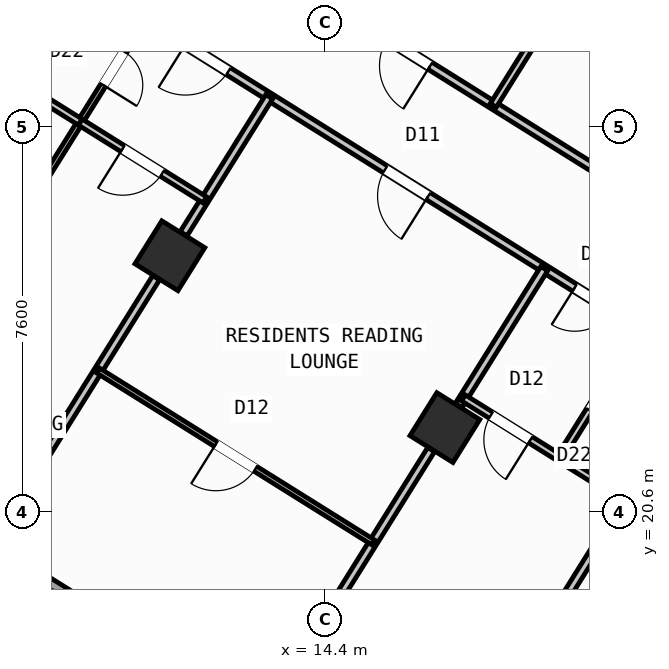
"""IFC4 building model, lengths in metres.
Left out: names, types, materials, properties, quantities, classifications, styles, units other than length and angle.
Written with IfcOpenShell. Run it as: python <this file> out.ifc"""

import sys

from ifc_helpers import new_model, si_unit, direction, frame, frame_2d, origin, origin_2d, place, context, subcontext, project, spatial, rectangle, hollow_rectangle, extrude, source, transform, mapped, element, fill, save


model = new_model("IFC4")
c1 = context("Model", 3, precision=1e-05, world=origin(), true_north=direction((0.0, 1.0)))
c2 = subcontext(c1, "Body", "Model", "MODEL_VIEW")
j1 = project(units=[si_unit("LENGTHUNIT", "METRE"), si_unit("PLANEANGLEUNIT", "RADIAN")], contexts=[c1])
p1 = place(None, origin())
s1 = spatial("IfcSite", under=j1, at=p1, CompositionType="ELEMENT")
p2 = place(p1, origin())
s2 = spatial("IfcBuilding", under=s1, at=p2, CompositionType="ELEMENT")
p3 = place(p2, frame((0.0, 0.0, 52.8)))
s3 = spatial("IfcBuildingStorey", under=s2, at=p3, CompositionType="ELEMENT", Elevation=52.8)
m1 = source(origin(), c2, "Body", "SweptSolid", [
    extrude(hollow_rectangle(XDim=1.0, YDim=1.0, WallThickness=0.04, at=origin_2d()), origin(), (0.0, 0.0, 1.0), 3.6),
])
for number, where, z_axis, x_axis in (
    (1, (16.764, 22.261, 0.0), (0.0, 0.0, 1.0), (-0.848, 0.53, 0.0)),
    (2, (11.336, 25.653, 0.0), (0.0, 0.0, 1.0), (-0.848, 0.53, 0.0)),
):
    element("IfcColumn", number, at=place(p3, frame(where, z_axis=z_axis, x_axis=x_axis)), inside=s3, PredefinedType="COLUMN", context=c2, shape_type="MappedRepresentation", body=[
        mapped(m1, transform((0.0, 0.0, 0.0), scale=1.0)),
    ])
p4 = place(p3, frame((29.268, 6.429, 0.0), z_axis=(0.0, 0.0, 1.0), x_axis=(-0.848049971435, 0.529916263149, 0.0)))
e3 = element("IfcWall", 3, at=p4, inside=s3, PredefinedType="STANDARD", context=c2, shape_type="SweptSolid", body=[
    extrude(rectangle(XDim=31.588, YDim=0.32, at=frame_2d((15.794, 0.0))), origin(), (0.0, 0.0, 1.0), 3.35),
])
p5 = place(p4, frame((16.362, 0.0, 0.0)))
e4 = element("IfcOpeningElement", 4, at=p5, cuts=e3, PredefinedType="OPENING", context=c2, shape_type="SweptSolid", body=[
    extrude(rectangle(XDim=1.2, YDim=2.15, at=frame_2d((0.6, 1.075))), frame((0.0, 0.17, 0.0), z_axis=(0.0, -1.0, 0.0), x_axis=(1.0, 0.0, 0.0)), (0.0, 0.0, 1.0), 0.34),
])
p6 = place(p4, frame((2.989, 0.0, 0.8)))
e5 = element("IfcOpeningElement", 5, at=p6, cuts=e3, PredefinedType="OPENING", context=c2, shape_type="SweptSolid", body=[
    extrude(rectangle(XDim=2.1, YDim=1.55, at=frame_2d((1.05, 0.775))), frame((0.0, 0.17, 0.0), z_axis=(0.0, -1.0, 0.0), x_axis=(1.0, 0.0, 0.0)), (0.0, 0.0, 1.0), 0.34),
])
p7 = place(p4, frame((8.359, 0.0, 0.8)))
e6 = element("IfcOpeningElement", 6, at=p7, cuts=e3, PredefinedType="OPENING", context=c2, shape_type="SweptSolid", body=[
    extrude(rectangle(XDim=2.1, YDim=1.55, at=frame_2d((1.05, 0.775))), frame((0.0, 0.17, 0.0), z_axis=(0.0, -1.0, 0.0), x_axis=(1.0, 0.0, 0.0)), (0.0, 0.0, 1.0), 0.34),
])
p8 = place(p4, frame((13.284, 0.0, 0.95)))
e7 = element("IfcOpeningElement", 7, at=p8, cuts=e3, PredefinedType="OPENING", context=c2, shape_type="SweptSolid", body=[
    extrude(rectangle(XDim=1.2, YDim=1.4, at=frame_2d((0.6, 0.7))), frame((0.0, 0.17, 0.0), z_axis=(0.0, -1.0, 0.0), x_axis=(1.0, 0.0, 0.0)), (0.0, 0.0, 1.0), 0.34),
])
p9 = place(p4, frame((20.259, 0.0, 0.95)))
e8 = element("IfcOpeningElement", 8, at=p9, cuts=e3, PredefinedType="OPENING", context=c2, shape_type="SweptSolid", body=[
    extrude(rectangle(XDim=1.2, YDim=1.4, at=frame_2d((0.6, 0.7))), frame((0.0, 0.17, 0.0), z_axis=(0.0, -1.0, 0.0), x_axis=(1.0, 0.0, 0.0)), (0.0, 0.0, 1.0), 0.34),
])
p10 = place(p4, frame((22.929, 0.0, 0.95)))
e9 = element("IfcOpeningElement", 9, at=p10, cuts=e3, PredefinedType="OPENING", context=c2, shape_type="SweptSolid", body=[
    extrude(rectangle(XDim=1.2, YDim=1.4, at=frame_2d((0.6, 0.7))), frame((0.0, 0.17, 0.0), z_axis=(0.0, -1.0, 0.0), x_axis=(1.0, 0.0, 0.0)), (0.0, 0.0, 1.0), 0.34),
])
p11 = place(p4, frame((26.106, 0.0, 0.85)))
e10 = element("IfcOpeningElement", 10, at=p11, cuts=e3, PredefinedType="OPENING", context=c2, shape_type="SweptSolid", body=[
    extrude(rectangle(XDim=1.5, YDim=1.5, at=frame_2d((0.75, 0.75))), frame((0.0, 0.17, 0.0), z_axis=(0.0, -1.0, 0.0), x_axis=(1.0, 0.0, 0.0)), (0.0, 0.0, 1.0), 0.34),
])
p12 = place(p4, frame((29.068, 0.0, 0.85)))
e11 = element("IfcOpeningElement", 11, at=p12, cuts=e3, PredefinedType="OPENING", context=c2, shape_type="SweptSolid", body=[
    extrude(rectangle(XDim=1.8, YDim=1.5, at=frame_2d((0.9, 0.75))), frame((0.0, 0.17, 0.0), z_axis=(0.0, -1.0, 0.0), x_axis=(1.0, 0.0, 0.0)), (0.0, 0.0, 1.0), 0.34),
])
p13 = place(p3, frame((2.415, 23.452, 0.0), z_axis=(0.0, 0.0, 1.0), x_axis=(0.52991049553, 0.848053575387, 0.0)))
e12 = element("IfcWall", 12, at=p13, inside=s3, PredefinedType="STANDARD", context=c2, shape_type="SweptSolid", body=[
    extrude(rectangle(XDim=21.587, YDim=0.32, at=frame_2d((10.794, 0.0))), origin(), (0.0, 0.0, 1.0), 2.725),
])
p14 = place(p13, frame((2.356, 0.0, 0.8)))
e13 = element("IfcOpeningElement", 13, at=p14, cuts=e12, PredefinedType="OPENING", context=c2, shape_type="SweptSolid", body=[
    extrude(rectangle(XDim=2.1, YDim=1.55, at=frame_2d((1.05, 0.775))), frame((0.0, 0.17, 0.0), z_axis=(0.0, -1.0, 0.0), x_axis=(1.0, 0.0, 0.0)), (0.0, 0.0, 1.0), 0.34),
])
p15 = place(p13, frame((8.639, 0.0, 1.0)))
e14 = element("IfcOpeningElement", 14, at=p15, cuts=e12, PredefinedType="OPENING", context=c2, shape_type="SweptSolid", body=[
    extrude(rectangle(XDim=0.9, YDim=1.25, at=frame_2d((0.45, 0.625))), frame((0.0, 0.17, 0.0), z_axis=(0.0, -1.0, 0.0), x_axis=(1.0, 0.0, 0.0)), (0.0, 0.0, 1.0), 0.34),
])
p16 = place(p13, frame((17.129, 0.0, 0.85)))
e15 = element("IfcOpeningElement", 15, at=p16, cuts=e12, PredefinedType="OPENING", context=c2, shape_type="SweptSolid", body=[
    extrude(rectangle(XDim=1.5, YDim=1.5, at=frame_2d((0.75, 0.75))), frame((0.0, 0.17, 0.0), z_axis=(0.0, -1.0, 0.0), x_axis=(1.0, 0.0, 0.0)), (0.0, 0.0, 1.0), 0.34),
])
p17 = place(p3, frame((14.138, 41.825, 0.0), z_axis=(0.0, 0.0, 1.0), x_axis=(0.848046498049, -0.529921821731, 0.0)))
e16 = element("IfcWall", 16, at=p17, inside=s3, PredefinedType="STANDARD", context=c2, shape_type="SweptSolid", body=[
    extrude(rectangle(XDim=31.588, YDim=0.32, at=frame_2d((15.794, 0.0))), origin(), (0.0, 0.0, 1.0), 3.35),
])
p18 = place(p17, frame((3.159, 0.0, 0.0)))
e17 = element("IfcOpeningElement", 17, at=p18, cuts=e16, PredefinedType="OPENING", context=c2, shape_type="SweptSolid", body=[
    extrude(rectangle(XDim=1.05, YDim=2.15, at=frame_2d((0.525, 1.075))), frame((0.0, 0.17, 0.0), z_axis=(0.0, -1.0, 0.0), x_axis=(1.0, 0.0, 0.0)), (0.0, 0.0, 1.0), 0.34),
])
p19 = place(p17, frame((0.906, 0.0, 1.0)))
e18 = element("IfcOpeningElement", 18, at=p19, cuts=e16, PredefinedType="OPENING", context=c2, shape_type="SweptSolid", body=[
    extrude(rectangle(XDim=0.9, YDim=1.25, at=frame_2d((0.45, 0.625))), frame((0.0, 0.17, 0.0), z_axis=(0.0, -1.0, 0.0), x_axis=(1.0, 0.0, 0.0)), (0.0, 0.0, 1.0), 0.34),
])
p20 = place(p17, frame((9.537, 0.0, 0.85)))
e19 = element("IfcOpeningElement", 19, at=p20, cuts=e16, PredefinedType="OPENING", context=c2, shape_type="SweptSolid", body=[
    extrude(rectangle(XDim=1.8, YDim=1.5, at=frame_2d((0.9, 0.75))), frame((0.0, 0.17, 0.0), z_axis=(0.0, -1.0, 0.0), x_axis=(1.0, 0.0, 0.0)), (0.0, 0.0, 1.0), 0.34),
])
p21 = place(p17, frame((13.899, 0.0, 0.85)))
e20 = element("IfcOpeningElement", 20, at=p21, cuts=e16, PredefinedType="OPENING", context=c2, shape_type="SweptSolid", body=[
    extrude(rectangle(XDim=1.5, YDim=1.5, at=frame_2d((0.75, 0.75))), frame((0.0, 0.17, 0.0), z_axis=(0.0, -1.0, 0.0), x_axis=(1.0, 0.0, 0.0)), (0.0, 0.0, 1.0), 0.34),
])
p22 = place(p17, frame((22.019, 0.0, 0.95)))
e21 = element("IfcOpeningElement", 21, at=p22, cuts=e16, PredefinedType="OPENING", context=c2, shape_type="SweptSolid", body=[
    extrude(rectangle(XDim=1.2, YDim=1.4, at=frame_2d((0.6, 0.7))), frame((0.0, 0.17, 0.0), z_axis=(0.0, -1.0, 0.0), x_axis=(1.0, 0.0, 0.0)), (0.0, 0.0, 1.0), 0.34),
])
p23 = place(p17, frame((27.569, 0.0, 0.95)))
e22 = element("IfcOpeningElement", 22, at=p23, cuts=e16, PredefinedType="OPENING", context=c2, shape_type="SweptSolid", body=[
    extrude(rectangle(XDim=1.2, YDim=1.4, at=frame_2d((0.6, 0.7))), frame((0.0, 0.17, 0.0), z_axis=(0.0, -1.0, 0.0), x_axis=(1.0, 0.0, 0.0)), (0.0, 0.0, 1.0), 0.34),
])
p24 = place(p3, frame((21.938, 23.391, 0.0), z_axis=(0.0, 0.0, 1.0), x_axis=(-0.529924725692, -0.848044683434, 0.0)))
e23 = element("IfcWall", 23, at=p24, inside=s3, PredefinedType="PARTITIONING", context=c2, shape_type="SweptSolid", body=[
    extrude(rectangle(XDim=10.35, YDim=0.16, at=frame_2d((5.175, 0.0))), origin(), (0.0, 0.0, 1.0), 3.34),
])
p25 = place(p3, frame((23.104, 25.256, 0.0), z_axis=(0.0, 0.0, 1.0), x_axis=(-0.848041752158, 0.529929416617, 0.0)))
e24 = element("IfcWall", 24, at=p25, inside=s3, PredefinedType="PARTITIONING", context=c2, shape_type="SweptSolid", body=[
    extrude(rectangle(XDim=16.73, YDim=0.16, at=frame_2d((8.365, 0.0))), origin(), (0.0, 0.0, 1.0), 3.34),
])
p26 = place(p25, frame((1.395, 0.0, 0.0)))
e25 = element("IfcOpeningElement", 25, at=p26, cuts=e24, PredefinedType="OPENING", context=c2, shape_type="SweptSolid", body=[
    extrude(rectangle(XDim=1.0, YDim=2.1, at=frame_2d((0.5, 1.05))), frame((0.0, 0.09, 0.0), z_axis=(0.0, -1.0, 0.0), x_axis=(1.0, 0.0, 0.0)), (0.0, 0.0, 1.0), 0.18),
])
p27 = place(p25, frame((7.82, 0.0, 0.0)))
e26 = element("IfcOpeningElement", 26, at=p27, cuts=e24, PredefinedType="OPENING", context=c2, shape_type="SweptSolid", body=[
    extrude(rectangle(XDim=1.0, YDim=2.1, at=frame_2d((0.5, 1.05))), frame((0.0, 0.09, 0.0), z_axis=(0.0, -1.0, 0.0), x_axis=(1.0, 0.0, 0.0)), (0.0, 0.0, 1.0), 0.18),
])
p28 = place(p25, frame((14.76, 0.0, 0.0)))
e27 = element("IfcOpeningElement", 27, at=p28, cuts=e24, PredefinedType="OPENING", context=c2, shape_type="SweptSolid", body=[
    extrude(rectangle(XDim=1.0, YDim=2.1, at=frame_2d((0.5, 1.05))), frame((0.0, 0.09, 0.0), z_axis=(0.0, -1.0, 0.0), x_axis=(1.0, 0.0, 0.0)), (0.0, 0.0, 1.0), 0.18),
])
p29 = place(p3, frame((21.938, 23.391, 0.0), z_axis=(0.0, 0.0, 1.0), x_axis=(-0.848045850158, 0.529922858565, 0.0)))
e28 = element("IfcWall", 28, at=p29, inside=s3, PredefinedType="PARTITIONING", context=c2, shape_type="SweptSolid", body=[
    extrude(rectangle(XDim=16.73, YDim=0.16, at=frame_2d((8.365, 0.0))), origin(), (0.0, 0.0, 1.0), 3.34),
])
p30 = place(p29, frame((2.22, 0.0, 0.0)))
e29 = element("IfcOpeningElement", 29, at=p30, cuts=e28, PredefinedType="OPENING", context=c2, shape_type="SweptSolid", body=[
    extrude(rectangle(XDim=0.86, YDim=2.05, at=frame_2d((0.43, 1.025))), frame((0.0, 0.09, 0.0), z_axis=(0.0, -1.0, 0.0), x_axis=(1.0, 0.0, 0.0)), (0.0, 0.0, 1.0), 0.18),
])
p31 = place(p29, frame((6.49, 0.0, 0.0)))
e30 = element("IfcOpeningElement", 30, at=p31, cuts=e28, PredefinedType="OPENING", context=c2, shape_type="SweptSolid", body=[
    extrude(rectangle(XDim=1.0, YDim=2.1, at=frame_2d((0.5, 1.05))), frame((0.0, 0.09, 0.0), z_axis=(0.0, -1.0, 0.0), x_axis=(1.0, 0.0, 0.0)), (0.0, 0.0, 1.0), 0.18),
])
p32 = place(p29, frame((11.14, 0.0, 0.0)))
e31 = element("IfcOpeningElement", 31, at=p32, cuts=e28, PredefinedType="OPENING", context=c2, shape_type="SweptSolid", body=[
    extrude(rectangle(XDim=1.0, YDim=2.1, at=frame_2d((0.5, 1.05))), frame((0.0, 0.09, 0.0), z_axis=(0.0, -1.0, 0.0), x_axis=(1.0, 0.0, 0.0)), (0.0, 0.0, 1.0), 0.18),
])
p33 = place(p3, frame((18.724, 25.399, 0.0), z_axis=(0.0, 0.0, 1.0), x_axis=(-0.529930102756, -0.848041323399, 0.0)))
e32 = element("IfcWall", 32, at=p33, inside=s3, PredefinedType="PARTITIONING", context=c2, shape_type="SweptSolid", body=[
    extrude(rectangle(XDim=3.188, YDim=0.16, at=frame_2d((1.594, 0.0))), origin(), (0.0, 0.0, 1.0), 2.725),
])
p34 = place(p3, frame((16.492, 21.827, 0.0), z_axis=(0.0, 0.0, 1.0), x_axis=(-0.529904608059, -0.848057254175, 0.0)))
e33 = element("IfcWall", 33, at=p34, inside=s3, PredefinedType="PARTITIONING", context=c2, shape_type="SweptSolid", body=[
    extrude(rectangle(XDim=5.351, YDim=0.16, at=frame_2d((2.675, 0.0))), origin(), (0.0, 0.0, 1.0), 2.725),
])
p35 = place(p3, frame((20.343, 20.838, 0.0), z_axis=(0.0, 0.0, 1.0), x_axis=(-0.848059820872, 0.529900500304, 0.0)))
e34 = element("IfcWall", 34, at=p35, inside=s3, PredefinedType="PLUMBINGWALL", context=c2, shape_type="SweptSolid", body=[
    extrude(rectangle(XDim=3.79, YDim=0.14, at=frame_2d((1.895, 0.0))), origin(), (0.0, 0.0, 1.0), 3.34),
])
p36 = place(p35, frame((2.23, 0.0, 0.0)))
e35 = element("IfcOpeningElement", 35, at=p36, cuts=e34, PredefinedType="OPENING", context=c2, shape_type="SweptSolid", body=[
    extrude(rectangle(XDim=0.92, YDim=2.08, at=frame_2d((0.46, 1.04))), frame((0.0, 0.08, 0.0), z_axis=(0.0, -1.0, 0.0), x_axis=(1.0, 0.0, 0.0)), (0.0, 0.0, 1.0), 0.16),
])
p37 = place(p3, frame((20.624, 24.212, 0.0), z_axis=(0.0, 0.0, 1.0), x_axis=(-0.529940615993, -0.848034753722, 0.0)))
e36 = element("IfcWall", 36, at=p37, inside=s3, PredefinedType="PLUMBINGWALL", context=c2, shape_type="SweptSolid", body=[
    extrude(rectangle(XDim=3.01, YDim=0.14, at=frame_2d((1.505, 0.0))), origin(), (0.0, 0.0, 1.0), 2.995),
])
p38 = place(p37, frame((1.115, 0.0, 0.0)))
e37 = element("IfcOpeningElement", 37, at=p38, cuts=e36, PredefinedType="OPENING", context=c2, shape_type="SweptSolid", body=[
    extrude(rectangle(XDim=0.78, YDim=2.05, at=frame_2d((0.39, 1.025))), frame((0.0, 0.08, 0.0), z_axis=(0.0, -1.0, 0.0), x_axis=(1.0, 0.0, 0.0)), (0.0, 0.0, 1.0), 0.16),
])
p39 = place(p3, frame((13.297, 28.791, 0.0), z_axis=(0.0, 0.0, 1.0), x_axis=(-0.529930102756, -0.848041323399, 0.0)))
e38 = element("IfcWall", 38, at=p39, inside=s3, PredefinedType="PARTITIONING", context=c2, shape_type="SweptSolid", body=[
    extrude(rectangle(XDim=3.188, YDim=0.16, at=frame_2d((1.594, 0.0))), origin(), (0.0, 0.0, 1.0), 2.725),
])
p40 = place(p3, frame((11.065, 25.219, 0.0), z_axis=(0.0, 0.0, 1.0), x_axis=(-0.529904608059, -0.848057254175, 0.0)))
e39 = element("IfcWall", 39, at=p40, inside=s3, PredefinedType="PARTITIONING", context=c2, shape_type="SweptSolid", body=[
    extrude(rectangle(XDim=5.351, YDim=0.16, at=frame_2d((2.675, 0.0))), origin(), (0.0, 0.0, 1.0), 2.725),
])
p41 = place(p3, frame((15.348, 19.995, 0.0), z_axis=(0.0, 0.0, 1.0), x_axis=(-0.848056163074, 0.529906354247, 0.0)))
e40 = element("IfcWall", 40, at=p41, inside=s3, PredefinedType="PARTITIONING", context=c2, shape_type="SweptSolid", body=[
    extrude(rectangle(XDim=6.4, YDim=0.11, at=frame_2d((3.2, 0.0))), origin(), (0.0, 0.0, 1.0), 3.34),
])
p42 = place(p41, frame((2.74, 0.0, 0.0)))
e41 = element("IfcOpeningElement", 41, at=p42, cuts=e40, PredefinedType="OPENING", context=c2, shape_type="SweptSolid", body=[
    extrude(rectangle(XDim=0.92, YDim=2.08, at=frame_2d((0.46, 1.04))), frame((0.0, 0.065, 0.0), z_axis=(0.0, -1.0, 0.0), x_axis=(1.0, 0.0, 0.0)), (0.0, 0.0, 1.0), 0.13),
])
p43 = place(p3, frame((10.837, 30.327, 0.0), z_axis=(0.0, 0.0, 1.0), x_axis=(-0.529912148489, -0.848052542525, 0.0)))
e42 = element("IfcWall", 42, at=p43, inside=s3, PredefinedType="PARTITIONING", context=c2, shape_type="SweptSolid", body=[
    extrude(rectangle(XDim=10.62, YDim=0.11, at=frame_2d((5.31, 0.0))), origin(), (0.0, 0.0, 1.0), 3.34),
])
p44 = place(p43, frame((0.76, 0.0, 0.0)))
e43 = element("IfcOpeningElement", 43, at=p44, cuts=e42, PredefinedType="OPENING", context=c2, shape_type="SweptSolid", body=[
    extrude(rectangle(XDim=0.78, YDim=2.05, at=frame_2d((0.39, 1.025))), frame((0.0, 0.065, 0.0), z_axis=(0.0, -1.0, 0.0), x_axis=(1.0, 0.0, 0.0)), (0.0, 0.0, 1.0), 0.13),
])
p45 = place(p43, frame((6.05, 0.0, 0.0)))
e44 = element("IfcOpeningElement", 44, at=p45, cuts=e42, PredefinedType="OPENING", context=c2, shape_type="SweptSolid", body=[
    extrude(rectangle(XDim=0.92, YDim=2.08, at=frame_2d((0.46, 1.04))), frame((0.0, 0.065, 0.0), z_axis=(0.0, -1.0, 0.0), x_axis=(1.0, 0.0, 0.0)), (0.0, 0.0, 1.0), 0.13),
])
p46 = place(p3, frame((12.025, 26.755, 0.0), z_axis=(0.0, 0.0, 1.0), x_axis=(-0.848059786386, 0.529900555496, 0.0)))
e45 = element("IfcWall", 45, at=p46, inside=s3, PredefinedType="PLUMBINGWALL", context=c2, shape_type="SweptSolid", body=[
    extrude(rectangle(XDim=2.9, YDim=0.14, at=frame_2d((1.45, 0.0))), origin(), (0.0, 0.0, 1.0), 3.34),
])
p47 = place(p46, frame((0.99, 0.0, 0.0)))
e46 = element("IfcOpeningElement", 46, at=p47, cuts=e45, PredefinedType="OPENING", context=c2, shape_type="SweptSolid", body=[
    extrude(rectangle(XDim=0.92, YDim=2.08, at=frame_2d((0.46, 1.04))), frame((0.0, 0.08, 0.0), z_axis=(0.0, -1.0, 0.0), x_axis=(1.0, 0.0, 0.0)), (0.0, 0.0, 1.0), 0.16),
])
p48 = place(p3, frame((9.566, 28.292, 0.0), z_axis=(0.0, 0.0, 1.0), x_axis=(-0.848021036626, 0.529962566074, 0.0)))
e47 = element("IfcWall", 47, at=p48, inside=s3, PredefinedType="PLUMBINGWALL", context=c2, shape_type="SweptSolid", body=[
    extrude(rectangle(XDim=3.62, YDim=0.14, at=frame_2d((1.81, 0.0))), origin(), (0.0, 0.0, 1.0), 3.34),
])
p49 = place(p3, frame((19.616, 31.657, 0.0), z_axis=(0.0, 0.0, 1.0), x_axis=(-0.529876336437, -0.84807491891, 0.0)))
e48 = element("IfcWall", 48, at=p49, inside=s3, PredefinedType="PLUMBINGWALL", context=c2, shape_type="SweptSolid", body=[
    extrude(rectangle(XDim=3.58, YDim=0.14, at=frame_2d((1.79, 0.0))), origin(), (0.0, 0.0, 1.0), 3.34),
])
p50 = place(p49, frame((1.4, 0.0, 0.0)))
e49 = element("IfcOpeningElement", 49, at=p50, cuts=e48, PredefinedType="OPENING", context=c2, shape_type="SweptSolid", body=[
    extrude(rectangle(XDim=0.78, YDim=2.05, at=frame_2d((0.39, 1.025))), frame((0.0, 0.08, 0.0), z_axis=(0.0, -1.0, 0.0), x_axis=(1.0, 0.0, 0.0)), (0.0, 0.0, 1.0), 0.16),
])
m2 = source(origin(), c2, "Body", "SweptSolid", [
    extrude(rectangle(XDim=1.2, YDim=1.4, at=frame_2d((0.6, 0.7))), frame((0.0, 0.03, 0.0), z_axis=(0.0, -1.0, 0.0), x_axis=(1.0, 0.0, 0.0)), (0.0, 0.0, 1.0), 0.06),
])
p51 = place(p10, origin())
e50 = element("IfcWindow", 50, at=p51, inside=s3, PartitioningType="SINGLE_PANEL", PredefinedType="WINDOW", context=c2, shape_type="MappedRepresentation", body=[
    mapped(m2, transform((0.0, 0.0, 0.0), scale=1.0)),
])
fill(e9, e50)
m3 = source(origin(), c2, "Body", "SweptSolid", [
    extrude(rectangle(XDim=0.86, YDim=2.05, at=frame_2d((0.43, 1.025))), frame((0.0, 0.025, 0.0), z_axis=(0.0, -1.0, 0.0), x_axis=(1.0, 0.0, 0.0)), (0.0, 0.0, 1.0), 0.05),
])
p52 = place(p30, origin())
e51 = element("IfcDoor", 51, at=p52, inside=s3, OperationType="SINGLE_SWING_RIGHT", PredefinedType="DOOR", context=c2, shape_type="MappedRepresentation", body=[
    mapped(m3, transform((0.0, 0.0, 0.0), scale=1.0)),
])
fill(e29, e51)
m4 = source(origin(), c2, "Body", "SweptSolid", [
    extrude(rectangle(XDim=0.92, YDim=2.08, at=frame_2d((0.46, 1.04))), frame((0.0, 0.025, 0.0), z_axis=(0.0, -1.0, 0.0), x_axis=(1.0, 0.0, 0.0)), (0.0, 0.0, 1.0), 0.05),
])
p53 = place(p36, origin())
e52 = element("IfcDoor", 52, at=p53, inside=s3, OperationType="SINGLE_SWING_LEFT", PredefinedType="DOOR", context=c2, shape_type="MappedRepresentation", body=[
    mapped(m4, transform((0.0, 0.0, 0.0), scale=1.0)),
])
fill(e35, e52)
m5 = source(origin(), c2, "Body", "SweptSolid", [
    extrude(rectangle(XDim=0.78, YDim=2.05, at=frame_2d((0.39, 1.025))), frame((0.0, 0.025, 0.0), z_axis=(0.0, -1.0, 0.0), x_axis=(1.0, 0.0, 0.0)), (0.0, 0.0, 1.0), 0.05),
])
p54 = place(p38, origin())
e53 = element("IfcDoor", 53, at=p54, inside=s3, OperationType="SINGLE_SWING_RIGHT", PredefinedType="DOOR", context=c2, shape_type="MappedRepresentation", body=[
    mapped(m5, transform((0.0, 0.0, 0.0), scale=1.0)),
])
fill(e37, e53)
m6 = source(origin(), c2, "Body", "SweptSolid", [
    extrude(rectangle(XDim=1.0, YDim=2.1, at=frame_2d((0.5, 1.05))), frame((0.0, 0.025, 0.0), z_axis=(0.0, -1.0, 0.0), x_axis=(1.0, 0.0, 0.0)), (0.0, 0.0, 1.0), 0.05),
])
p55 = place(p31, origin())
e54 = element("IfcDoor", 54, at=p55, inside=s3, OperationType="SINGLE_SWING_LEFT", PredefinedType="DOOR", context=c2, shape_type="MappedRepresentation", body=[
    mapped(m6, transform((0.0, 0.0, 0.0), scale=1.0)),
])
fill(e30, e54)
p56 = place(p42, origin())
e55 = element("IfcDoor", 55, at=p56, inside=s3, OperationType="SINGLE_SWING_RIGHT", PredefinedType="DOOR", context=c2, shape_type="MappedRepresentation", body=[
    mapped(m4, transform((0.0, 0.0, 0.0), scale=1.0)),
])
fill(e41, e55)
p57 = place(p32, origin())
e56 = element("IfcDoor", 56, at=p57, inside=s3, OperationType="SINGLE_SWING_RIGHT", PredefinedType="DOOR", context=c2, shape_type="MappedRepresentation", body=[
    mapped(m6, transform((0.0, 0.0, 0.0), scale=1.0)),
])
fill(e31, e56)
p58 = place(p47, origin())
e57 = element("IfcDoor", 57, at=p58, inside=s3, OperationType="SINGLE_SWING_RIGHT", PredefinedType="DOOR", context=c2, shape_type="MappedRepresentation", body=[
    mapped(m4, transform((0.0, 0.0, 0.0), scale=1.0)),
])
fill(e46, e57)
p59 = place(p44, origin())
e58 = element("IfcDoor", 58, at=p59, inside=s3, OperationType="SINGLE_SWING_RIGHT", PredefinedType="DOOR", context=c2, shape_type="MappedRepresentation", body=[
    mapped(m5, transform((0.0, 0.0, 0.0), scale=1.0)),
])
fill(e43, e58)
p60 = place(p27, origin())
e59 = element("IfcDoor", 59, at=p60, inside=s3, OperationType="SINGLE_SWING_LEFT", PredefinedType="DOOR", context=c2, shape_type="MappedRepresentation", body=[
    mapped(m6, transform((0.0, 0.0, 0.0), scale=1.0)),
])
fill(e26, e59)
save(model, sys.argv[1])
